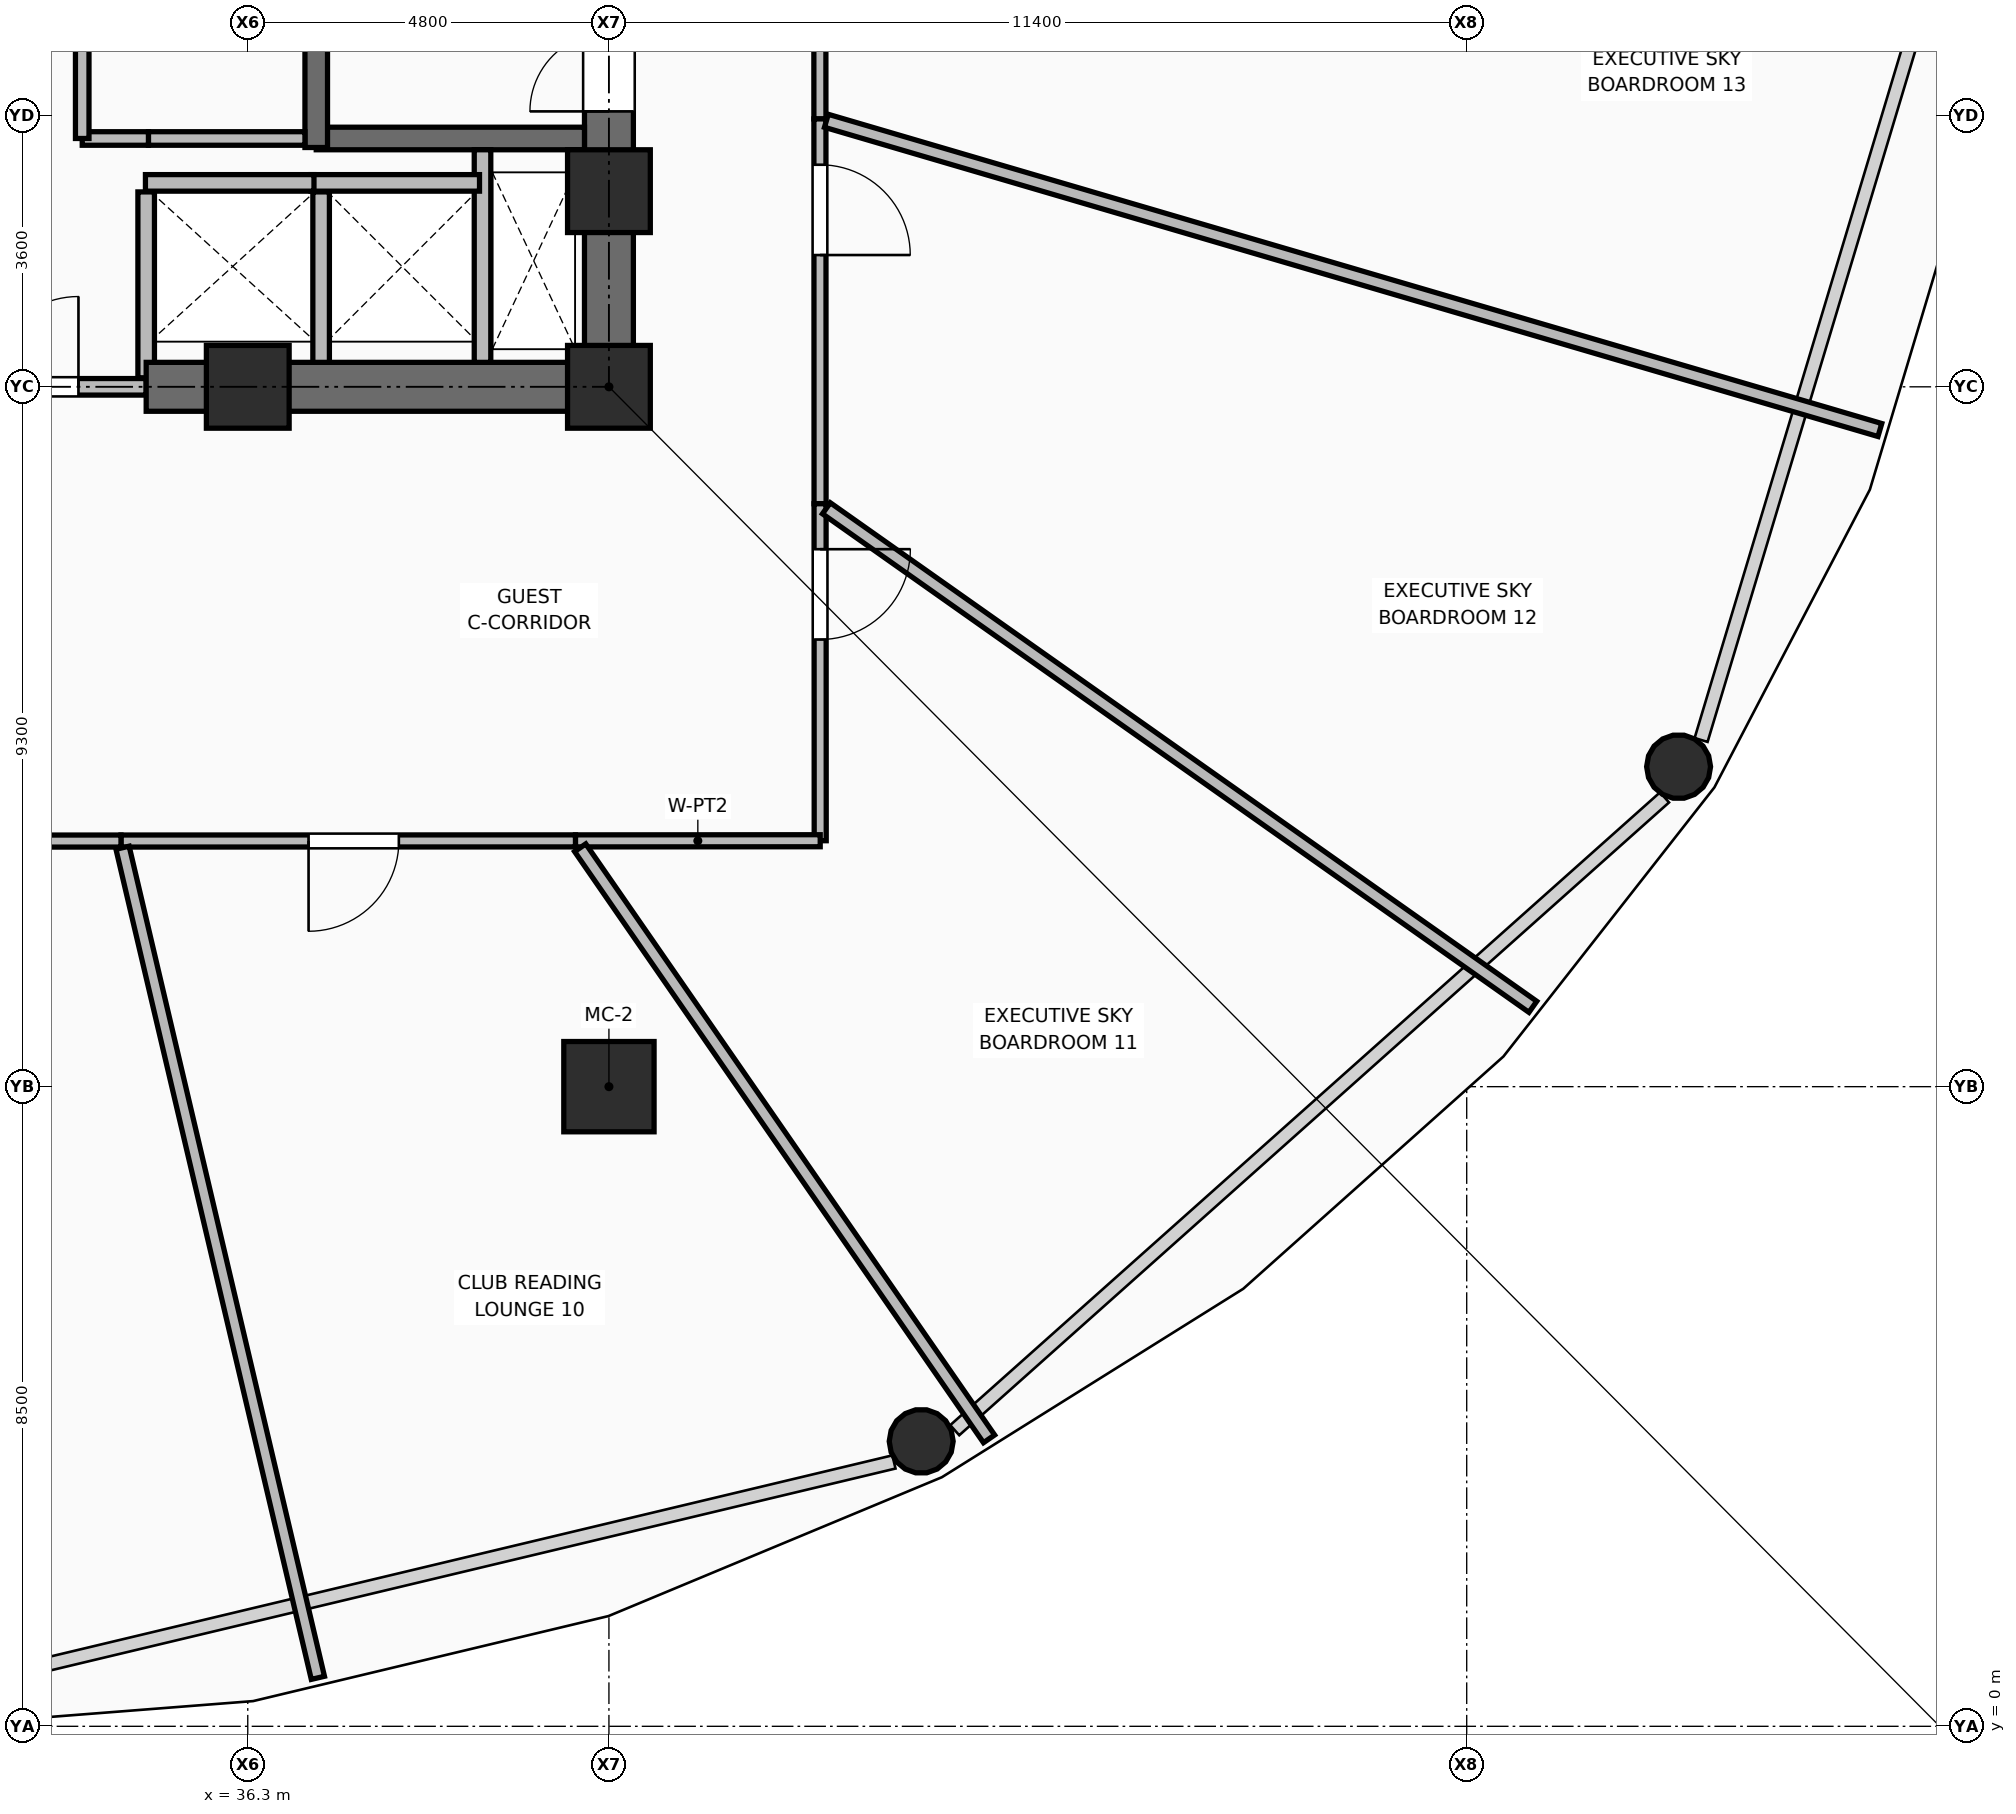
"""IFC4 building model, lengths in metres.
Left out: names, types, materials, properties, quantities, classifications, styles, units other than length and angle.
Written with IfcOpenShell. Run it as: python <this file> out.ifc"""

import sys

from ifc_helpers import new_model, si_unit, direction, frame, frame_2d, origin, origin_2d, place, context, subcontext, project, spatial, rectangle, hollow_rectangle, hollow_circle, extrude, element, fill, save


model = new_model("IFC4")
c1 = context("Model", 3, precision=1e-05, world=origin(), true_north=direction((0.0, 1.0)))
c2 = subcontext(c1, "Body", "Model", "MODEL_VIEW")
j1 = project(units=[si_unit("LENGTHUNIT", "METRE"), si_unit("PLANEANGLEUNIT", "RADIAN")], contexts=[c1])
p1 = place(None, origin())
s1 = spatial("IfcSite", under=j1, at=p1, CompositionType="ELEMENT")
p2 = place(p1, origin())
s2 = spatial("IfcBuilding", under=s1, at=p2, CompositionType="ELEMENT")
p3 = place(p2, frame((0.0, 0.0, 87.0)))
s3 = spatial("IfcBuildingStorey", under=s2, at=p3, CompositionType="ELEMENT", Elevation=87.0)
for number, where, z_axis, x_axis in (
    (1, (36.3, 17.8, 0.0), (0.0, 0.0, 1.0), (1.0, 0.0, 0.0)),
    (2, (41.1, 17.8, 0.0), (0.0, 0.0, 1.0), (1.0, 0.0, 0.0)),
    (3, (41.1, 20.4, 0.0), (0.0, 0.0, 1.0), (1.0, 0.0, 0.0)),
):
    element("IfcColumn", number, at=place(p3, frame(where, z_axis=z_axis, x_axis=x_axis)), inside=s3, PredefinedType="COLUMN", context=c2, shape_type="SweptSolid", body=[
        extrude(rectangle(XDim=1.1, YDim=1.1, at=origin_2d()), origin(), (0.0, 0.0, 1.0), 3.75),
    ])
p4 = place(p3, frame((41.1, 8.5, 0.0), z_axis=(0.0, 0.0, 1.0), x_axis=(1.0, 0.0, 0.0)))
e4 = element("IfcColumn", 4, at=p4, inside=s3, PredefinedType="COLUMN", context=c2, shape_type="SweptSolid", body=[
    extrude(hollow_rectangle(XDim=1.2, YDim=1.2, WallThickness=0.045, at=origin_2d()), origin(), (0.0, 0.0, 1.0), 3.75),
])
p5 = place(p3, frame((45.25, 3.787, 0.0), z_axis=(-0.063867569811, 0.098710723407, 0.993064512814), x_axis=(-0.839585964149, -0.543226848383, 0.0)))
e5 = element("IfcColumn", 5, at=p5, inside=s3, PredefinedType="COLUMN", context=c2, shape_type="SweptSolid", body=[
    extrude(hollow_circle(Radius=0.425, WallThickness=0.04, at=origin_2d()), origin(), (0.0, 0.0, 1.0), 3.524),
])
p6 = place(p3, frame((55.316, 12.752, 0.0), z_axis=(-0.110533289521, 0.056962365232, 0.992238721707), x_axis=(-0.458089880056, -0.888905879039, 0.0)))
e6 = element("IfcColumn", 6, at=p6, inside=s3, PredefinedType="COLUMN", context=c2, shape_type="SweptSolid", body=[
    extrude(hollow_circle(Radius=0.425, WallThickness=0.04, at=origin_2d()), origin(), (0.0, 0.0, 1.0), 3.527),
])
p7 = place(p3, frame((34.95, 17.92, 0.0), z_axis=(0.0, 0.0, 1.0), x_axis=(0.0, 1.0, 0.0)))
e7 = element("IfcWall", 7, at=p7, inside=s3, PredefinedType="PARTITIONING", context=c2, shape_type="SweptSolid", body=[
    extrude(rectangle(XDim=2.47, YDim=0.22, at=frame_2d((1.235, 0.0))), origin(), (0.0, 0.0, 1.0), 2.858),
])
p8 = place(p3, frame((37.275, 18.08, 0.0), z_axis=(0.0, 0.0, 1.0), x_axis=(0.0, 1.0, 0.0)))
e8 = element("IfcWall", 8, at=p8, inside=s3, PredefinedType="PARTITIONING", context=c2, shape_type="SweptSolid", body=[
    extrude(rectangle(XDim=2.31, YDim=0.22, at=frame_2d((1.155, 0.0))), origin(), (0.0, 0.0, 1.0), 3.475),
])
p9 = place(p3, frame((32.45, 17.8, 0.0), z_axis=(0.0, 0.0, 1.0), x_axis=(1.0, 0.0, 0.0)))
e9 = element("IfcWall", 9, at=p9, inside=s3, PredefinedType="PARTITIONING", context=c2, shape_type="SweptSolid", body=[
    extrude(rectangle(XDim=2.5, YDim=0.22, at=frame_2d((1.25, 0.0))), origin(), (0.0, 0.0, 1.0), 2.858),
])
p10 = place(p9, frame((0.4, 0.0, 0.0)))
e10 = element("IfcOpeningElement", 10, at=p10, cuts=e9, PredefinedType="OPENING", context=c2, shape_type="SweptSolid", body=[
    extrude(rectangle(XDim=1.2, YDim=2.1, at=frame_2d((0.6, 1.05))), frame((0.0, 0.12, 0.0), z_axis=(0.0, -1.0, 0.0), x_axis=(1.0, 0.0, 0.0)), (0.0, 0.0, 1.0), 0.24),
])
p11 = place(p3, frame((34.95, 17.8, 0.0), z_axis=(0.0, 0.0, 1.0), x_axis=(1.0, 0.0, 0.0)))
e11 = element("IfcWall", 11, at=p11, inside=s3, PredefinedType="SHEAR", context=c2, shape_type="SweptSolid", body=[
    extrude(rectangle(XDim=6.475, YDim=0.65, at=frame_2d((3.238, 0.0))), origin(), (0.0, 0.0, 1.0), 3.5),
])
p12 = place(p3, frame((41.1, 18.125, 0.0), z_axis=(0.0, 0.0, 1.0), x_axis=(0.0, 1.0, 0.0)))
e12 = element("IfcWall", 12, at=p12, inside=s3, PredefinedType="SHEAR", context=c2, shape_type="SweptSolid", body=[
    extrude(rectangle(XDim=14.0, YDim=0.65, at=frame_2d((7.0, 0.0))), origin(), (0.0, 0.0, 1.0), 3.5),
])
p13 = place(p12, frame((3.335, 0.0, 0.0)))
e13 = element("IfcOpeningElement", 13, at=p13, cuts=e12, PredefinedType="OPENING", context=c2, shape_type="SweptSolid", body=[
    extrude(rectangle(XDim=1.05, YDim=2.1, at=frame_2d((0.525, 1.05))), frame((0.0, 0.335, 0.0), z_axis=(0.0, -1.0, 0.0), x_axis=(1.0, 0.0, 0.0)), (0.0, 0.0, 1.0), 0.67),
])
p14 = place(p3, frame((37.21, 21.1, 0.0), z_axis=(0.0, 0.0, 1.0), x_axis=(1.0, 0.0, 0.0)))
e14 = element("IfcWall", 14, at=p14, inside=s3, PredefinedType="SHEAR", context=c2, shape_type="SweptSolid", body=[
    extrude(rectangle(XDim=3.565, YDim=0.3, at=frame_2d((1.782, 0.0))), origin(), (0.0, 0.0, 1.0), 3.5),
])
p15 = place(p3, frame((37.21, 20.98, 0.0), z_axis=(0.0, 0.0, 1.0), x_axis=(0.0, 1.0, 0.0)))
e15 = element("IfcWall", 15, at=p15, inside=s3, PredefinedType="SHEAR", context=c2, shape_type="SweptSolid", body=[
    extrude(rectangle(XDim=7.99, YDim=0.3, at=frame_2d((3.995, 0.0))), origin(), (0.0, 0.0, 1.0), 3.5),
])
p16 = place(p3, frame((39.42, 18.125, 0.0), z_axis=(0.0, 0.0, 1.0), x_axis=(0.0, 1.0, 0.0)))
e16 = element("IfcWall", 16, at=p16, inside=s3, PredefinedType="PARTITIONING", context=c2, shape_type="SweptSolid", body=[
    extrude(rectangle(XDim=2.825, YDim=0.22, at=frame_2d((1.413, 0.0))), origin(), (0.0, 0.0, 1.0), 3.48),
])
for number, where, z_axis, x_axis in (
    (17, (37.14, 20.51, 0.0), (0.0, 0.0, 1.0), (1.0, 0.0, 0.0)),
    (18, (34.94, 20.51, 0.0), (0.0, 0.0, 1.0), (1.0, 0.0, 0.0)),
):
    element("IfcWall", number, at=place(p3, frame(where, z_axis=z_axis, x_axis=x_axis)), inside=s3, PredefinedType="PARTITIONING", context=c2, shape_type="SweptSolid", body=[
        extrude(rectangle(XDim=2.24, YDim=0.22, at=frame_2d((1.12, 0.0))), origin(), (0.0, 0.0, 1.0), 3.48),
    ])
p17 = place(p3, frame((34.98, 21.1, 0.0), z_axis=(0.0, 0.0, 1.0), x_axis=(1.0, 0.0, 0.0)))
e19 = element("IfcWall", 19, at=p17, inside=s3, PredefinedType="PARTITIONING", context=c2, shape_type="SweptSolid", body=[
    extrude(rectangle(XDim=2.08, YDim=0.18, at=frame_2d((1.04, 0.0))), origin(), (0.0, 0.0, 1.0), 3.48),
])
p18 = place(p3, frame((34.1, 21.1, 0.0), z_axis=(0.0, 0.0, 1.0), x_axis=(1.0, 0.0, 0.0)))
e20 = element("IfcWall", 20, at=p18, inside=s3, PredefinedType="PARTITIONING", context=c2, shape_type="SweptSolid", body=[
    extrude(rectangle(XDim=0.88, YDim=0.18, at=frame_2d((0.44, 0.0))), origin(), (0.0, 0.0, 1.0), 3.48),
])
p19 = place(p3, frame((34.1, 21.1, 0.0), z_axis=(0.0, 0.0, 1.0), x_axis=(0.0, 1.0, 0.0)))
e21 = element("IfcWall", 21, at=p19, inside=s3, PredefinedType="PARTITIONING", context=c2, shape_type="SweptSolid", body=[
    extrude(rectangle(XDim=4.55, YDim=0.18, at=frame_2d((2.275, 0.0))), origin(), (0.0, 0.0, 1.0), 3.48),
])
p20 = place(p19, frame((1.825, 0.0, 0.0)))
e22 = element("IfcOpeningElement", 22, at=p20, cuts=e21, PredefinedType="OPENING", context=c2, shape_type="SweptSolid", body=[
    extrude(rectangle(XDim=0.9, YDim=2.1, at=frame_2d((0.45, 1.05))), frame((0.0, 0.1, 0.0), z_axis=(0.0, -1.0, 0.0), x_axis=(1.0, 0.0, 0.0)), (0.0, 0.0, 1.0), 0.2),
])
p21 = place(p3, frame((43.902, 25.391, 0.0), z_axis=(0.0, 0.0, 1.0), x_axis=(0.000484525411, -0.999999882618, 0.0)))
e23 = element("IfcWall", 23, at=p21, inside=s3, PredefinedType="PARTITIONING", context=c2, shape_type="SweptSolid", body=[
    extrude(rectangle(XDim=4.031, YDim=0.16, at=frame_2d((2.016, 0.0))), origin(), (0.0, 0.0, 1.0), 2.858),
])
p22 = place(p21, frame((1.342, 0.0, 0.0)))
e24 = element("IfcOpeningElement", 24, at=p22, cuts=e23, PredefinedType="OPENING", context=c2, shape_type="SweptSolid", body=[
    extrude(rectangle(XDim=1.2, YDim=2.1, at=frame_2d((0.6, 1.05))), frame((0.0, 0.09, 0.0), z_axis=(0.0, -1.0, 0.0), x_axis=(1.0, 0.0, 0.0)), (0.0, 0.0, 1.0), 0.18),
])
p23 = place(p3, frame((43.904, 21.36, 0.0), z_axis=(0.0, 0.0, 1.0), x_axis=(0.000381916237, -0.99999992707, 0.0)))
e25 = element("IfcWall", 25, at=p23, inside=s3, PredefinedType="PARTITIONING", context=c2, shape_type="SweptSolid", body=[
    extrude(rectangle(XDim=5.114, YDim=0.16, at=frame_2d((2.557, 0.0))), origin(), (0.0, 0.0, 1.0), 2.858),
])
p24 = place(p23, frame((0.609, 0.0, 0.0)))
e26 = element("IfcOpeningElement", 26, at=p24, cuts=e25, PredefinedType="OPENING", context=c2, shape_type="SweptSolid", body=[
    extrude(rectangle(XDim=1.2, YDim=2.1, at=frame_2d((0.6, 1.05))), frame((0.0, 0.09, 0.0), z_axis=(0.0, -1.0, 0.0), x_axis=(1.0, 0.0, 0.0)), (0.0, 0.0, 1.0), 0.18),
])
p25 = place(p3, frame((43.906, 16.246, 0.0), z_axis=(0.0, 0.0, 1.0), x_axis=(0.000436157411, -0.999999904883, 0.0)))
e27 = element("IfcWall", 27, at=p25, inside=s3, PredefinedType="PARTITIONING", context=c2, shape_type="SweptSolid", body=[
    extrude(rectangle(XDim=4.478, YDim=0.16, at=frame_2d((2.239, 0.0))), origin(), (0.0, 0.0, 1.0), 3.48),
])
p26 = place(p25, frame((0.604, 0.0, 0.0)))
e28 = element("IfcOpeningElement", 28, at=p26, cuts=e27, PredefinedType="OPENING", context=c2, shape_type="SweptSolid", body=[
    extrude(rectangle(XDim=1.2, YDim=2.1, at=frame_2d((0.6, 1.05))), frame((0.0, 0.09, 0.0), z_axis=(0.0, -1.0, 0.0), x_axis=(1.0, 0.0, 0.0)), (0.0, 0.0, 1.0), 0.18),
])
p27 = place(p3, frame((43.908, 11.768, 0.0), z_axis=(0.0, 0.0, 1.0), x_axis=(-0.999999819748, -0.000600420186, 0.0)))
e29 = element("IfcWall", 29, at=p27, inside=s3, PredefinedType="PARTITIONING", context=c2, shape_type="SweptSolid", body=[
    extrude(rectangle(XDim=3.253, YDim=0.16, at=frame_2d((1.626, 0.0))), origin(), (0.0, 0.0, 1.0), 2.858),
])
p28 = place(p3, frame((40.655, 11.766, 0.0), z_axis=(0.0, 0.0, 1.0), x_axis=(-0.999999933831, -0.000363783323, 0.0)))
e30 = element("IfcWall", 30, at=p28, inside=s3, PredefinedType="PARTITIONING", context=c2, shape_type="SweptSolid", body=[
    extrude(rectangle(XDim=6.04, YDim=0.16, at=frame_2d((3.02, 0.0))), origin(), (0.0, 0.0, 1.0), 3.48),
])
p29 = place(p28, frame((2.347, 0.0, 0.0)))
e31 = element("IfcOpeningElement", 31, at=p29, cuts=e30, PredefinedType="OPENING", context=c2, shape_type="SweptSolid", body=[
    extrude(rectangle(XDim=1.2, YDim=2.1, at=frame_2d((0.6, 1.05))), frame((0.0, 0.09, 0.0), z_axis=(0.0, -1.0, 0.0), x_axis=(1.0, 0.0, 0.0)), (0.0, 0.0, 1.0), 0.18),
])
p30 = place(p3, frame((34.615, 11.764, 0.0), z_axis=(0.0, 0.0, 1.0), x_axis=(-0.999999899846, -0.00044755741, 0.0)))
e32 = element("IfcWall", 32, at=p30, inside=s3, PredefinedType="PARTITIONING", context=c2, shape_type="SweptSolid", body=[
    extrude(rectangle(XDim=10.91, YDim=0.16, at=frame_2d((5.455, 0.0))), origin(), (0.0, 0.0, 1.0), 2.858),
])
p31 = place(p30, frame((4.78, 0.0, 0.0)))
e33 = element("IfcOpeningElement", 33, at=p31, cuts=e32, PredefinedType="OPENING", context=c2, shape_type="SweptSolid", body=[
    extrude(rectangle(XDim=1.2, YDim=2.1, at=frame_2d((0.6, 1.05))), frame((0.0, 0.09, 0.0), z_axis=(0.0, -1.0, 0.0), x_axis=(1.0, 0.0, 0.0)), (0.0, 0.0, 1.0), 0.18),
])
p32 = place(p3, frame((34.636, 11.675, 0.0), z_axis=(0.0, 0.0, 1.0), x_axis=(0.229074156674, -0.973408974041, 0.0)))
e34 = element("IfcWall", 34, at=p32, inside=s3, PredefinedType="PARTITIONING", context=c2, shape_type="SweptSolid", body=[
    extrude(rectangle(XDim=11.332, YDim=0.18, at=frame_2d((5.666, 0.0))), origin(), (0.0, 0.0, 1.0), 2.705),
])
p33 = place(p3, frame((40.718, 11.675, 0.0), z_axis=(0.0, 0.0, 1.0), x_axis=(0.568928165184, -0.822387221971, 0.0)))
e35 = element("IfcWall", 35, at=p33, inside=s3, PredefinedType="PARTITIONING", context=c2, shape_type="SweptSolid", body=[
    extrude(rectangle(XDim=9.552, YDim=0.18, at=frame_2d((4.776, 0.0))), origin(), (0.0, 0.0, 1.0), 2.705),
])
p34 = place(p3, frame((43.99, 16.186, 0.0), z_axis=(0.0, 0.0, 1.0), x_axis=(0.817069126353, -0.576539714817, 0.0)))
e36 = element("IfcWall", 36, at=p34, inside=s3, PredefinedType="PARTITIONING", context=c2, shape_type="SweptSolid", body=[
    extrude(rectangle(XDim=11.491, YDim=0.18, at=frame_2d((5.746, 0.0))), origin(), (0.0, 0.0, 1.0), 2.705),
])
p35 = place(p3, frame((43.99, 21.335, 0.0), z_axis=(0.0, 0.0, 1.0), x_axis=(0.959533182325, -0.281595582383, 0.0)))
e37 = element("IfcWall", 37, at=p35, inside=s3, PredefinedType="PARTITIONING", context=c2, shape_type="SweptSolid", body=[
    extrude(rectangle(XDim=14.592, YDim=0.18, at=frame_2d((7.296, 0.0))), origin(), (0.0, 0.0, 1.0), 2.705),
])
p36 = place(p10, origin())
e38 = element("IfcDoor", 38, at=p36, inside=s3, OperationType="SINGLE_SWING_RIGHT", PredefinedType="DOOR", context=c2, shape_type="SweptSolid", body=[
    extrude(rectangle(XDim=1.2, YDim=2.1, at=frame_2d((0.6, 1.05))), frame((0.0, 0.025, 0.0), z_axis=(0.0, -1.0, 0.0), x_axis=(1.0, 0.0, 0.0)), (0.0, 0.0, 1.0), 0.05),
])
fill(e10, e38)
p37 = place(p13, origin())
e39 = element("IfcDoor", 39, at=p37, inside=s3, OperationType="SINGLE_SWING_LEFT", PredefinedType="DOOR", context=c2, shape_type="SweptSolid", body=[
    extrude(rectangle(XDim=1.05, YDim=2.1, at=frame_2d((0.525, 1.05))), frame((0.0, 0.025, 0.0), z_axis=(0.0, -1.0, 0.0), x_axis=(1.0, 0.0, 0.0)), (0.0, 0.0, 1.0), 0.05),
])
fill(e13, e39)
p38 = place(p29, origin())
e40 = element("IfcDoor", 40, at=p38, inside=s3, OperationType="SINGLE_SWING_RIGHT", PredefinedType="DOOR", context=c2, shape_type="SweptSolid", body=[
    extrude(rectangle(XDim=1.2, YDim=2.1, at=frame_2d((0.6, 1.05))), frame((0.0, 0.025, 0.0), z_axis=(0.0, -1.0, 0.0), x_axis=(1.0, 0.0, 0.0)), (0.0, 0.0, 1.0), 0.05),
])
fill(e31, e40)
p39 = place(p26, origin())
e41 = element("IfcDoor", 41, at=p39, inside=s3, OperationType="SINGLE_SWING_LEFT", PredefinedType="DOOR", context=c2, shape_type="SweptSolid", body=[
    extrude(rectangle(XDim=1.2, YDim=2.1, at=frame_2d((0.6, 1.05))), frame((0.0, 0.025, 0.0), z_axis=(0.0, -1.0, 0.0), x_axis=(1.0, 0.0, 0.0)), (0.0, 0.0, 1.0), 0.05),
])
fill(e28, e41)
p40 = place(p24, origin())
e42 = element("IfcDoor", 42, at=p40, inside=s3, OperationType="SINGLE_SWING_RIGHT", PredefinedType="DOOR", context=c2, shape_type="SweptSolid", body=[
    extrude(rectangle(XDim=1.2, YDim=2.1, at=frame_2d((0.6, 1.05))), frame((0.0, 0.025, 0.0), z_axis=(0.0, -1.0, 0.0), x_axis=(1.0, 0.0, 0.0)), (0.0, 0.0, 1.0), 0.05),
])
fill(e26, e42)
save(model, sys.argv[1])
